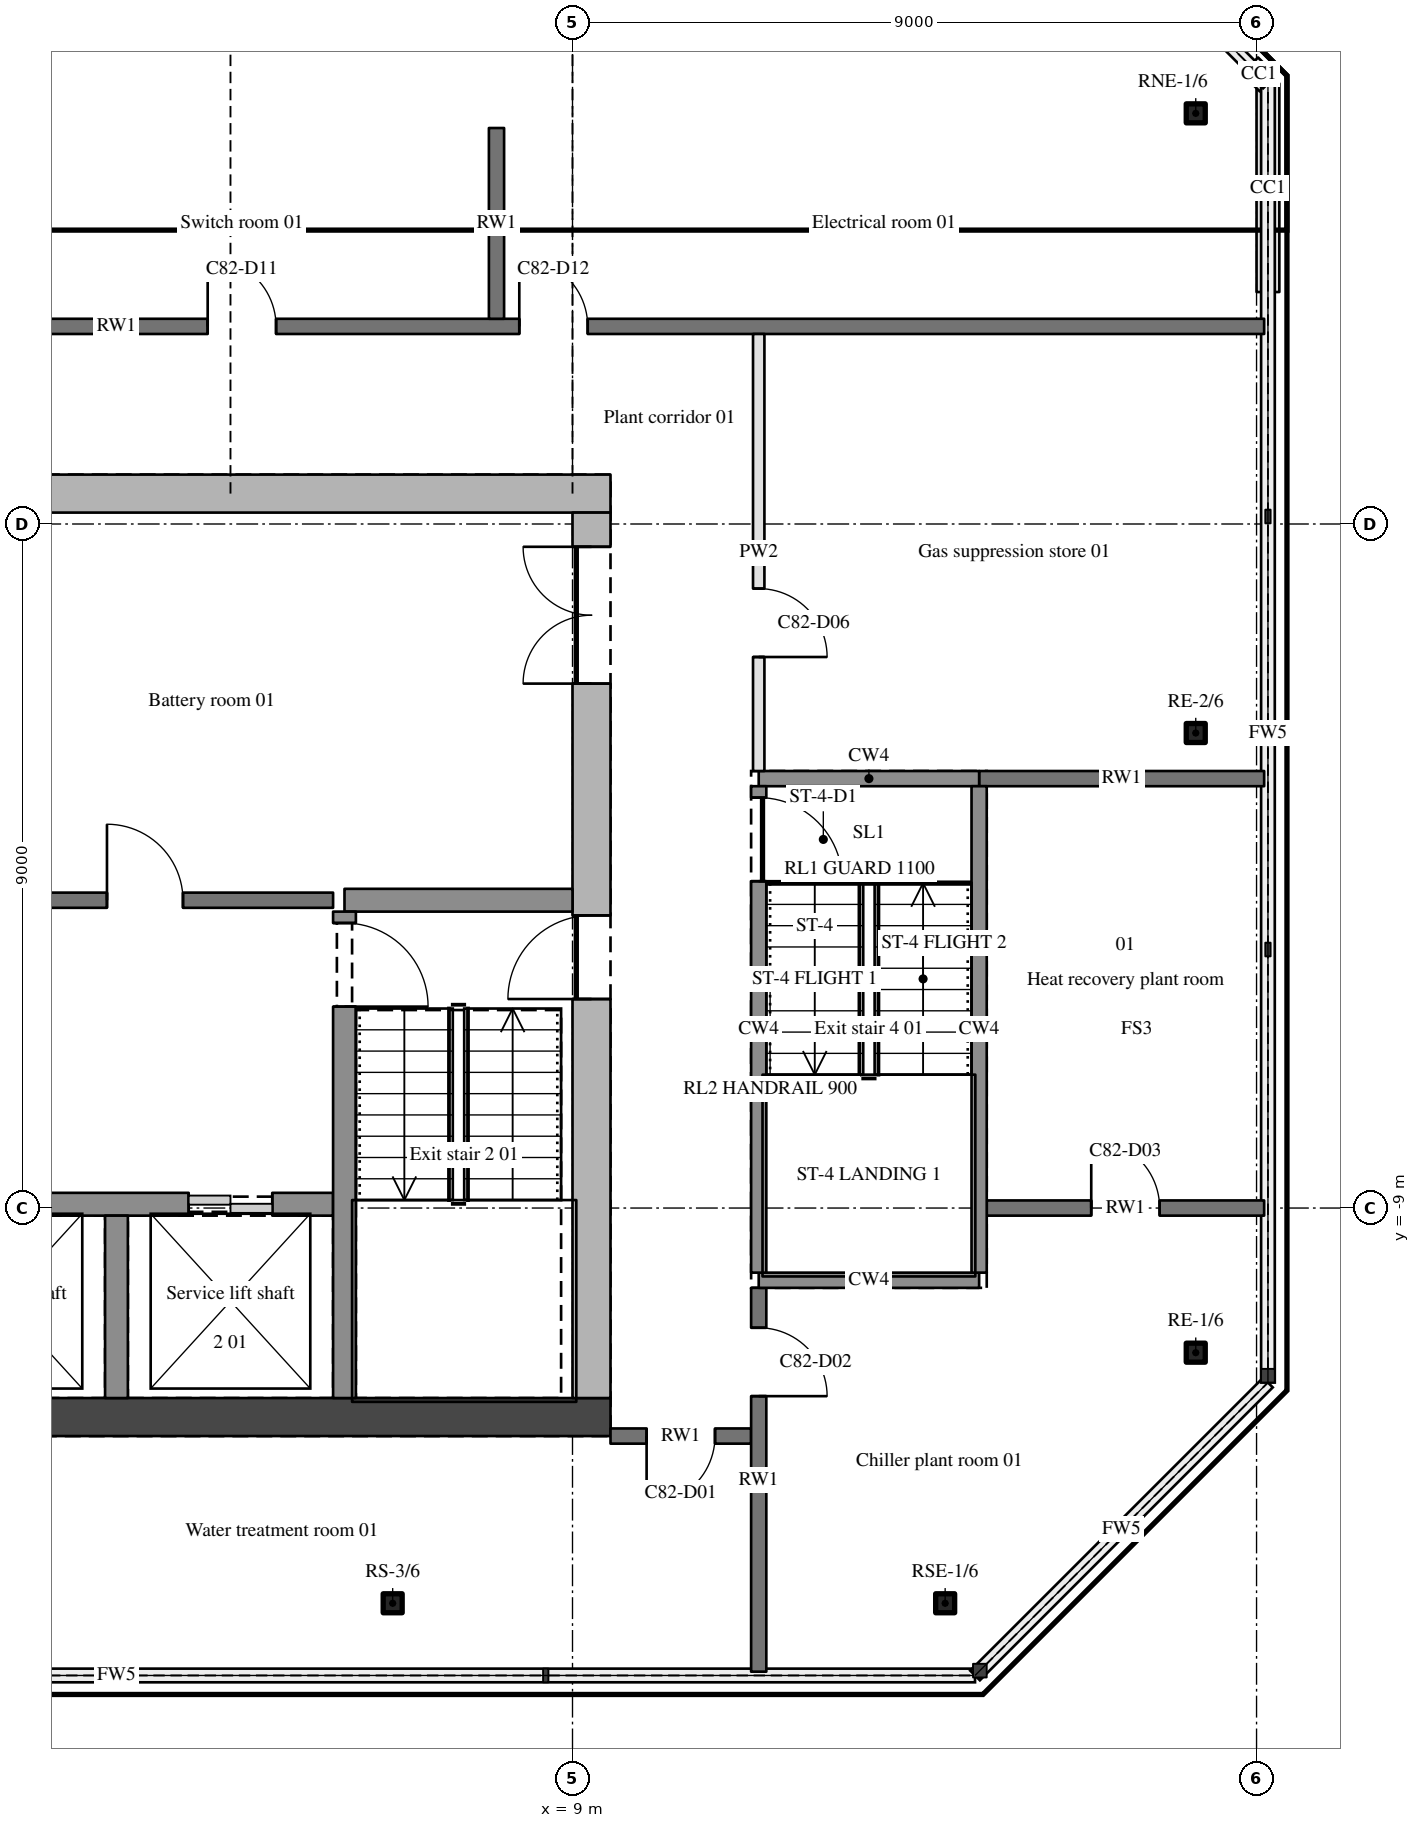
"""IFC4 building model, lengths in metres.
Left out: names, types, materials, properties, quantities, classifications, styles, units other than length and angle.
Written with IfcOpenShell. Run it as: python <this file> out.ifc"""

import sys

from ifc_helpers import new_model, si_unit, direction, frame, frame_2d, origin, origin_2d, place, context, subcontext, project, spatial, polyline, rectangle, hollow_rectangle, outline, extrude, element, fill, save


model = new_model("IFC4")
c1 = context("Model", 3, precision=1e-05, world=origin(), true_north=direction((0.0, 1.0)))
c2 = subcontext(c1, "Body", "Model", "MODEL_VIEW")
j1 = project(units=[si_unit("LENGTHUNIT", "METRE"), si_unit("PLANEANGLEUNIT", "RADIAN")], contexts=[c1])
p1 = place(None, origin())
s1 = spatial("IfcSite", under=j1, at=p1, CompositionType="ELEMENT")
p2 = place(p1, origin())
s2 = spatial("IfcBuilding", under=s1, at=p2, CompositionType="ELEMENT")
p3 = place(p2, frame((0.0, 0.0, 304.5)))
s3 = spatial("IfcBuildingStorey", under=s2, at=p3, CompositionType="ELEMENT", Elevation=304.5)
for number, where, z_axis, x_axis in (
    (1, (6.634, -14.2, 0.0), (0.0, 0.0, 1.0), (1.0, 0.0, 0.0)),
    (2, (13.903, -14.2, 0.0), (0.0, 0.0, 1.0), (1.0, 0.0, 0.0)),
    (3, (17.2, -10.903, 0.0), (0.0, 0.0, 1.0), (1.0, 0.0, 0.0)),
    (4, (17.2, -2.75, 0.0), (0.0, 0.0, 1.0), (1.0, 0.0, 0.0)),
):
    element("IfcColumn", number, at=place(p3, frame(where, z_axis=z_axis, x_axis=x_axis)), inside=s3, PredefinedType="COLUMN", context=c2, shape_type="SweptSolid", body=[
        extrude(hollow_rectangle(XDim=0.25, YDim=0.25, WallThickness=0.02, InnerFilletRadius=0.03, OuterFilletRadius=0.05, at=origin_2d()), origin(), (0.0, 0.0, 1.0), 3.6),
    ])
p4 = place(p3, frame((17.2, 5.403, 0.0), z_axis=(0.0, 0.0, 1.0), x_axis=(1.0, 0.0, 0.0)))
e5 = element("IfcColumn", 5, at=p4, inside=s3, PredefinedType="COLUMN", context=c2, shape_type="SweptSolid", body=[
    extrude(hollow_rectangle(XDim=0.25, YDim=0.25, WallThickness=0.02, InnerFilletRadius=0.03, OuterFilletRadius=0.05, at=origin_2d()), origin(), (0.0, 0.0, 1.0), 3.392),
])
for number, where, z_axis, x_axis in (
    (6, (-9.5, -11.75, 0.0), (0.0, 0.0, 1.0), (1.0, 0.0, 0.0)),
    (7, (-9.5, 0.4, 0.0), (0.0, 0.0, 1.0), (1.0, 0.0, 0.0)),
):
    element("IfcWall", number, at=place(p3, frame(where, z_axis=z_axis, x_axis=x_axis)), inside=s3, PredefinedType="SHEAR", context=c2, shape_type="SweptSolid", body=[
        extrude(outline(polyline([(0.0, 0.0), (19.0, 0.0), (19.0, 3.6), (0.0, 3.6), (0.0, 0.0)])), frame((0.0, 0.25, 0.0), z_axis=(0.0, -1.0, 0.0), x_axis=(1.0, 0.0, 0.0)), (0.0, 0.0, 1.0), 0.5),
    ])
p5 = place(p3, frame((9.25, -11.5, 0.0), z_axis=(0.0, 0.0, 1.0), x_axis=(0.0, 1.0, 0.0)))
e8 = element("IfcWall", 8, at=p5, inside=s3, PredefinedType="SHEAR", context=c2, shape_type="SweptSolid", body=[
    extrude(outline(polyline([(0.0, 0.0), (11.65, 0.0), (11.65, 3.6), (0.0, 3.6), (0.0, 0.0)])), frame((0.0, 0.25, 0.0), z_axis=(0.0, -1.0, 0.0), x_axis=(1.0, 0.0, 0.0)), (0.0, 0.0, 1.0), 0.5),
])
p6 = place(p5, frame((9.4, 0.0, 0.0)))
e9 = element("IfcOpeningElement", 9, at=p6, cuts=e8, PredefinedType="OPENING", context=c2, shape_type="SweptSolid", body=[
    extrude(rectangle(XDim=1.8, YDim=2.1, at=frame_2d((0.9, 1.05))), frame((0.0, 0.26, 0.0), z_axis=(0.0, -1.0, 0.0), x_axis=(1.0, 0.0, 0.0)), (0.0, 0.0, 1.0), 0.52),
])
p7 = place(p5, frame((5.25, 0.0, 0.0)))
e10 = element("IfcOpeningElement", 10, at=p7, cuts=e8, PredefinedType="OPENING", context=c2, shape_type="SweptSolid", body=[
    extrude(rectangle(XDim=1.1, YDim=2.1, at=frame_2d((0.55, 1.05))), frame((0.0, 0.26, 0.0), z_axis=(0.0, -1.0, 0.0), x_axis=(1.0, 0.0, 0.0)), (0.0, 0.0, 1.0), 0.52),
])
p8 = place(p3, frame((11.35, -12.0, 0.0), z_axis=(0.0, 0.0, 1.0), x_axis=(-1.0, 0.0, 0.0)))
e11 = element("IfcWall", 11, at=p8, inside=s3, PredefinedType="SOLIDWALL", context=c2, shape_type="SweptSolid", body=[
    extrude(rectangle(XDim=1.85, YDim=0.2, at=frame_2d((0.925, 0.0))), origin(), (0.0, 0.0, 1.0), 2.66),
])
p9 = place(p8, frame((0.475, 0.0, 0.0)))
e12 = element("IfcOpeningElement", 12, at=p9, cuts=e11, PredefinedType="OPENING", context=c2, shape_type="SweptSolid", body=[
    extrude(rectangle(XDim=0.9, YDim=2.1, at=frame_2d((0.45, 1.05))), frame((0.0, 0.11, 0.0), z_axis=(0.0, -1.0, 0.0), x_axis=(1.0, 0.0, 0.0)), (0.0, 0.0, 1.0), 0.22),
])
p10 = place(p3, frame((11.45, -9.95, 0.0), z_axis=(0.0, 0.0, 1.0), x_axis=(1.0, 0.0, 0.0)))
e13 = element("IfcWall", 13, at=p10, inside=s3, PredefinedType="SHEAR", context=c2, shape_type="SweptSolid", body=[
    extrude(rectangle(XDim=2.9, YDim=0.2, at=frame_2d((1.45, 0.0))), origin(), (0.0, 0.0, 1.0), 3.6),
])
p11 = place(p3, frame((14.45, -9.0, 0.0), z_axis=(0.0, 0.0, 1.0), x_axis=(1.0, 0.0, 0.0)))
e14 = element("IfcWall", 14, at=p11, inside=s3, PredefinedType="SOLIDWALL", context=c2, shape_type="SweptSolid", body=[
    extrude(rectangle(XDim=3.65, YDim=0.2, at=frame_2d((1.825, 0.0))), origin(), (0.0, 0.0, 1.0), 2.66),
])
p12 = place(p11, frame((1.375, 0.0, 0.0)))
e15 = element("IfcOpeningElement", 15, at=p12, cuts=e14, PredefinedType="OPENING", context=c2, shape_type="SweptSolid", body=[
    extrude(rectangle(XDim=0.9, YDim=2.1, at=frame_2d((0.45, 1.05))), frame((0.0, 0.11, 0.0), z_axis=(0.0, -1.0, 0.0), x_axis=(1.0, 0.0, 0.0)), (0.0, 0.0, 1.0), 0.22),
])
p13 = place(p3, frame((-5.85, -8.95, 0.0), z_axis=(0.0, 0.0, 1.0), x_axis=(1.0, 0.0, 0.0)))
e16 = element("IfcWall", 16, at=p13, inside=s3, PredefinedType="SHEAR", context=c2, shape_type="SweptSolid", body=[
    extrude(rectangle(XDim=11.7, YDim=0.3, at=frame_2d((5.85, 0.0))), origin(), (0.0, 0.0, 1.0), 3.6),
])
p14 = place(p13, frame((0.8, 0.0, 0.0)))
e17 = element("IfcOpeningElement", 17, at=p14, cuts=e16, PredefinedType="OPENING", context=c2, shape_type="SweptSolid", body=[
    extrude(rectangle(XDim=1.1, YDim=2.1, at=frame_2d((0.55, 1.05))), frame((0.0, 0.16, 0.0), z_axis=(0.0, -1.0, 0.0), x_axis=(1.0, 0.0, 0.0)), (0.0, 0.0, 1.0), 0.32),
])
p15 = place(p13, frame((3.8, 0.0, 0.0)))
e18 = element("IfcOpeningElement", 18, at=p15, cuts=e16, PredefinedType="OPENING", context=c2, shape_type="SweptSolid", body=[
    extrude(rectangle(XDim=1.1, YDim=2.1, at=frame_2d((0.55, 1.05))), frame((0.0, 0.16, 0.0), z_axis=(0.0, -1.0, 0.0), x_axis=(1.0, 0.0, 0.0)), (0.0, 0.0, 1.0), 0.32),
])
p16 = place(p13, frame((6.8, 0.0, 0.0)))
e19 = element("IfcOpeningElement", 19, at=p16, cuts=e16, PredefinedType="OPENING", context=c2, shape_type="SweptSolid", body=[
    extrude(rectangle(XDim=1.1, YDim=2.1, at=frame_2d((0.55, 1.05))), frame((0.0, 0.16, 0.0), z_axis=(0.0, -1.0, 0.0), x_axis=(1.0, 0.0, 0.0)), (0.0, 0.0, 1.0), 0.32),
])
p17 = place(p13, frame((9.8, 0.0, 0.0)))
e20 = element("IfcOpeningElement", 20, at=p17, cuts=e16, PredefinedType="OPENING", context=c2, shape_type="SweptSolid", body=[
    extrude(rectangle(XDim=1.1, YDim=2.1, at=frame_2d((0.55, 1.05))), frame((0.0, 0.16, 0.0), z_axis=(0.0, -1.0, 0.0), x_axis=(1.0, 0.0, 0.0)), (0.0, 0.0, 1.0), 0.32),
])
p18 = place(p3, frame((0.9, -4.95, 0.0), z_axis=(0.0, 0.0, 1.0), x_axis=(1.0, 0.0, 0.0)))
e21 = element("IfcWall", 21, at=p18, inside=s3, PredefinedType="SOLIDWALL", context=c2, shape_type="SweptSolid", body=[
    extrude(rectangle(XDim=4.95, YDim=0.2, at=frame_2d((2.475, 0.0))), origin(), (0.0, 0.0, 1.0), 3.3),
])
p19 = place(p18, frame((1.975, 0.0, 0.0)))
e22 = element("IfcOpeningElement", 22, at=p19, cuts=e21, PredefinedType="OPENING", context=c2, shape_type="SweptSolid", body=[
    extrude(rectangle(XDim=1.0, YDim=2.1, at=frame_2d((0.5, 1.05))), frame((0.0, 0.11, 0.0), z_axis=(0.0, -1.0, 0.0), x_axis=(1.0, 0.0, 0.0)), (0.0, 0.0, 1.0), 0.22),
])
p20 = place(p3, frame((6.0, -4.95, 0.0), z_axis=(0.0, 0.0, 1.0), x_axis=(1.0, 0.0, 0.0)))
e23 = element("IfcWall", 23, at=p20, inside=s3, PredefinedType="SHEAR", context=c2, shape_type="SweptSolid", body=[
    extrude(rectangle(XDim=3.0, YDim=0.3, at=frame_2d((1.5, 0.0))), origin(), (0.0, 0.0, 1.0), 3.6),
])
p21 = place(p3, frame((11.45, -3.35, 0.0), z_axis=(0.0, 0.0, 1.0), x_axis=(1.0, 0.0, 0.0)))
e24 = element("IfcWall", 24, at=p21, inside=s3, PredefinedType="SHEAR", context=c2, shape_type="SweptSolid", body=[
    extrude(rectangle(XDim=2.9, YDim=0.2, at=frame_2d((1.45, 0.0))), origin(), (0.0, 0.0, 1.0), 3.6),
])
p22 = place(p3, frame((14.35, -3.35, 0.0), z_axis=(0.0, 0.0, 1.0), x_axis=(1.0, 0.0, 0.0)))
e25 = element("IfcWall", 25, at=p22, inside=s3, PredefinedType="SOLIDWALL", context=c2, shape_type="SweptSolid", body=[
    extrude(rectangle(XDim=3.75, YDim=0.2, at=frame_2d((1.875, 0.0))), origin(), (0.0, 0.0, 1.0), 2.66),
])
p23 = place(p3, frame((-12.1, 2.6, 0.0), z_axis=(0.0, 0.0, 1.0), x_axis=(1.0, 0.0, 0.0)))
e26 = element("IfcWall", 26, at=p23, inside=s3, PredefinedType="SOLIDWALL", context=c2, shape_type="SweptSolid", body=[
    extrude(rectangle(XDim=30.2, YDim=0.2, at=frame_2d((15.1, 0.0))), origin(), (0.0, 0.0, 1.0), 2.66),
])
p24 = place(p23, frame((6.25, 0.0, 0.0)))
e27 = element("IfcOpeningElement", 27, at=p24, cuts=e26, PredefinedType="OPENING", context=c2, shape_type="SweptSolid", body=[
    extrude(rectangle(XDim=0.9, YDim=2.1, at=frame_2d((0.45, 1.05))), frame((0.0, 0.11, 0.0), z_axis=(0.0, -1.0, 0.0), x_axis=(1.0, 0.0, 0.0)), (0.0, 0.0, 1.0), 0.22),
])
p25 = place(p23, frame((16.3, 0.0, 0.0)))
e28 = element("IfcOpeningElement", 28, at=p25, cuts=e26, PredefinedType="OPENING", context=c2, shape_type="SweptSolid", body=[
    extrude(rectangle(XDim=0.9, YDim=2.1, at=frame_2d((0.45, 1.05))), frame((0.0, 0.11, 0.0), z_axis=(0.0, -1.0, 0.0), x_axis=(1.0, 0.0, 0.0)), (0.0, 0.0, 1.0), 0.22),
])
p26 = place(p23, frame((20.4, 0.0, 0.0)))
e29 = element("IfcOpeningElement", 29, at=p26, cuts=e26, PredefinedType="OPENING", context=c2, shape_type="SweptSolid", body=[
    extrude(rectangle(XDim=0.9, YDim=2.1, at=frame_2d((0.45, 1.05))), frame((0.0, 0.11, 0.0), z_axis=(0.0, -1.0, 0.0), x_axis=(1.0, 0.0, 0.0)), (0.0, 0.0, 1.0), 0.22),
])
p27 = place(p3, frame((3.0, -11.5, 0.0), z_axis=(0.0, 0.0, 1.0), x_axis=(0.0, 1.0, 0.0)))
e30 = element("IfcWall", 30, at=p27, inside=s3, PredefinedType="SHEAR", context=c2, shape_type="SweptSolid", body=[
    extrude(rectangle(XDim=2.4, YDim=0.3, at=frame_2d((1.2, 0.0))), origin(), (0.0, 0.0, 1.0), 3.6),
])
p28 = place(p3, frame((6.0, -5.1, 0.0), z_axis=(0.0, 0.0, 1.0), x_axis=(0.0, -1.0, 0.0)))
e31 = element("IfcWall", 31, at=p28, inside=s3, PredefinedType="SHEAR", context=c2, shape_type="SweptSolid", body=[
    extrude(rectangle(XDim=6.4, YDim=0.3, at=frame_2d((3.2, 0.0))), origin(), (0.0, 0.0, 1.0), 3.6),
])
p29 = place(p28, frame((0.15, 0.0, 0.0)))
e32 = element("IfcOpeningElement", 32, at=p29, cuts=e31, PredefinedType="OPENING", context=c2, shape_type="SweptSolid", body=[
    extrude(rectangle(XDim=1.1, YDim=2.1, at=frame_2d((0.55, 1.05))), frame((0.0, 0.16, 0.0), z_axis=(0.0, -1.0, 0.0), x_axis=(1.0, 0.0, 0.0)), (0.0, 0.0, 1.0), 0.32),
])
p30 = place(p3, frame((8.0, 2.7, 0.0), z_axis=(0.0, 0.0, 1.0), x_axis=(0.0, 1.0, 0.0)))
e33 = element("IfcWall", 33, at=p30, inside=s3, PredefinedType="SOLIDWALL", context=c2, shape_type="SweptSolid", body=[
    extrude(rectangle(XDim=2.51, YDim=0.2, at=frame_2d((1.255, 0.0))), origin(), (0.0, 0.0, 1.0), 2.66),
])
p31 = place(p3, frame((11.45, -10.05, 0.0), z_axis=(0.0, 0.0, 1.0), x_axis=(0.0, -1.0, 0.0)))
e34 = element("IfcWall", 34, at=p31, inside=s3, PredefinedType="SOLIDWALL", context=c2, shape_type="SweptSolid", body=[
    extrude(rectangle(XDim=5.05, YDim=0.2, at=frame_2d((2.525, 0.0))), origin(), (0.0, 0.0, 1.0), 2.66),
])
p32 = place(p31, frame((0.525, 0.0, 0.0)))
e35 = element("IfcOpeningElement", 35, at=p32, cuts=e34, PredefinedType="OPENING", context=c2, shape_type="SweptSolid", body=[
    extrude(rectangle(XDim=0.9, YDim=2.1, at=frame_2d((0.45, 1.05))), frame((0.0, 0.11, 0.0), z_axis=(0.0, -1.0, 0.0), x_axis=(1.0, 0.0, 0.0)), (0.0, 0.0, 1.0), 0.22),
])
p33 = place(p3, frame((11.45, -3.45, 0.0), z_axis=(0.0, 0.0, 1.0), x_axis=(0.0, -1.0, 0.0)))
e36 = element("IfcWall", 36, at=p33, inside=s3, PredefinedType="SHEAR", context=c2, shape_type="SweptSolid", body=[
    extrude(rectangle(XDim=6.4, YDim=0.2, at=frame_2d((3.2, 0.0))), origin(), (0.0, 0.0, 1.0), 3.6),
])
p34 = place(p33, frame((0.15, 0.0, 0.0)))
e37 = element("IfcOpeningElement", 37, at=p34, cuts=e36, PredefinedType="OPENING", context=c2, shape_type="SweptSolid", body=[
    extrude(rectangle(XDim=1.1, YDim=2.1, at=frame_2d((0.55, 1.05))), frame((0.0, 0.11, 0.0), z_axis=(0.0, -1.0, 0.0), x_axis=(1.0, 0.0, 0.0)), (0.0, 0.0, 1.0), 0.22),
])
p35 = place(p3, frame((11.45, 2.5, 0.0), z_axis=(0.0, 0.0, 1.0), x_axis=(0.0, -1.0, 0.0)))
e38 = element("IfcWall", 38, at=p35, inside=s3, PredefinedType="PARTITIONING", context=c2, shape_type="SweptSolid", body=[
    extrude(rectangle(XDim=5.75, YDim=0.15, at=frame_2d((2.875, 0.0))), origin(), (0.0, 0.0, 1.0), 2.66),
])
p36 = place(p35, frame((3.35, 0.0, 0.0)))
e39 = element("IfcOpeningElement", 39, at=p36, cuts=e38, PredefinedType="OPENING", context=c2, shape_type="SweptSolid", body=[
    extrude(rectangle(XDim=0.9, YDim=2.1, at=frame_2d((0.45, 1.05))), frame((0.0, 0.085, 0.0), z_axis=(0.0, -1.0, 0.0), x_axis=(1.0, 0.0, 0.0)), (0.0, 0.0, 1.0), 0.17),
])
p37 = place(p3, frame((14.35, -9.85, 0.0), z_axis=(0.0, 0.0, 1.0), x_axis=(0.0, 1.0, 0.0)))
e40 = element("IfcWall", 40, at=p37, inside=s3, PredefinedType="SHEAR", context=c2, shape_type="SweptSolid", body=[
    extrude(rectangle(XDim=6.4, YDim=0.2, at=frame_2d((3.2, 0.0))), origin(), (0.0, 0.0, 1.0), 3.6),
])
p38 = place(p6, origin())
e41 = element("IfcDoor", 41, at=p38, inside=s3, OperationType="DOUBLE_DOOR_SINGLE_SWING", PredefinedType="DOOR", context=c2, shape_type="SweptSolid", body=[
    extrude(rectangle(XDim=1.8, YDim=2.1, at=frame_2d((0.9, 1.05))), frame((0.0, 0.025, 0.0), z_axis=(0.0, -1.0, 0.0), x_axis=(1.0, 0.0, 0.0)), (0.0, 0.0, 1.0), 0.05),
])
fill(e9, e41)
p39 = place(p19, origin())
e42 = element("IfcDoor", 42, at=p39, inside=s3, OperationType="SINGLE_SWING_LEFT", PredefinedType="DOOR", context=c2, shape_type="SweptSolid", body=[
    extrude(rectangle(XDim=1.0, YDim=2.1, at=frame_2d((0.5, 1.05))), frame((0.0, 0.025, 0.0), z_axis=(0.0, -1.0, 0.0), x_axis=(1.0, 0.0, 0.0)), (0.0, 0.0, 1.0), 0.05),
])
fill(e22, e42)
p40 = place(p29, origin())
e43 = element("IfcDoor", 43, at=p40, inside=s3, OperationType="SINGLE_SWING_RIGHT", PredefinedType="DOOR", context=c2, shape_type="SweptSolid", body=[
    extrude(rectangle(XDim=1.1, YDim=2.1, at=frame_2d((0.55, 1.05))), frame((0.0, 0.025, 0.0), z_axis=(0.0, -1.0, 0.0), x_axis=(1.0, 0.0, 0.0)), (0.0, 0.0, 1.0), 0.05),
])
fill(e32, e43)
p41 = place(p7, origin())
e44 = element("IfcDoor", 44, at=p41, inside=s3, OperationType="SINGLE_SWING_LEFT", PredefinedType="DOOR", context=c2, shape_type="SweptSolid", body=[
    extrude(rectangle(XDim=1.1, YDim=2.1, at=frame_2d((0.55, 1.05))), frame((0.0, 0.025, 0.0), z_axis=(0.0, -1.0, 0.0), x_axis=(1.0, 0.0, 0.0)), (0.0, 0.0, 1.0), 0.05),
])
fill(e10, e44)
p42 = place(p34, origin())
e45 = element("IfcDoor", 45, at=p42, inside=s3, OperationType="SINGLE_SWING_RIGHT", PredefinedType="DOOR", context=c2, shape_type="SweptSolid", body=[
    extrude(rectangle(XDim=1.1, YDim=2.1, at=frame_2d((0.55, 1.05))), frame((0.0, 0.025, 0.0), z_axis=(0.0, -1.0, 0.0), x_axis=(1.0, 0.0, 0.0)), (0.0, 0.0, 1.0), 0.05),
])
fill(e37, e45)
p43 = place(p32, origin())
e46 = element("IfcDoor", 46, at=p43, inside=s3, OperationType="SINGLE_SWING_RIGHT", PredefinedType="DOOR", context=c2, shape_type="SweptSolid", body=[
    extrude(rectangle(XDim=0.9, YDim=2.1, at=frame_2d((0.45, 1.05))), frame((0.0, 0.025, 0.0), z_axis=(0.0, -1.0, 0.0), x_axis=(1.0, 0.0, 0.0)), (0.0, 0.0, 1.0), 0.05),
])
fill(e35, e46)
p44 = place(p36, origin())
e47 = element("IfcDoor", 47, at=p44, inside=s3, OperationType="SINGLE_SWING_RIGHT", PredefinedType="DOOR", context=c2, shape_type="SweptSolid", body=[
    extrude(rectangle(XDim=0.9, YDim=2.1, at=frame_2d((0.45, 1.05))), frame((0.0, 0.025, 0.0), z_axis=(0.0, -1.0, 0.0), x_axis=(1.0, 0.0, 0.0)), (0.0, 0.0, 1.0), 0.05),
])
fill(e39, e47)
p45 = place(p25, origin())
e48 = element("IfcDoor", 48, at=p45, inside=s3, OperationType="SINGLE_SWING_LEFT", PredefinedType="DOOR", context=c2, shape_type="SweptSolid", body=[
    extrude(rectangle(XDim=0.9, YDim=2.1, at=frame_2d((0.45, 1.05))), frame((0.0, 0.025, 0.0), z_axis=(0.0, -1.0, 0.0), x_axis=(1.0, 0.0, 0.0)), (0.0, 0.0, 1.0), 0.05),
])
fill(e28, e48)
p46 = place(p26, origin())
e49 = element("IfcDoor", 49, at=p46, inside=s3, OperationType="SINGLE_SWING_LEFT", PredefinedType="DOOR", context=c2, shape_type="SweptSolid", body=[
    extrude(rectangle(XDim=0.9, YDim=2.1, at=frame_2d((0.45, 1.05))), frame((0.0, 0.025, 0.0), z_axis=(0.0, -1.0, 0.0), x_axis=(1.0, 0.0, 0.0)), (0.0, 0.0, 1.0), 0.05),
])
fill(e29, e49)
p47 = place(p9, origin())
e50 = element("IfcDoor", 50, at=p47, inside=s3, OperationType="SINGLE_SWING_RIGHT", PredefinedType="DOOR", context=c2, shape_type="SweptSolid", body=[
    extrude(rectangle(XDim=0.9, YDim=2.1, at=frame_2d((0.45, 1.05))), frame((0.0, 0.025, 0.0), z_axis=(0.0, -1.0, 0.0), x_axis=(1.0, 0.0, 0.0)), (0.0, 0.0, 1.0), 0.05),
])
fill(e12, e50)
p48 = place(p12, origin())
e51 = element("IfcDoor", 51, at=p48, inside=s3, OperationType="SINGLE_SWING_LEFT", PredefinedType="DOOR", context=c2, shape_type="SweptSolid", body=[
    extrude(rectangle(XDim=0.9, YDim=2.1, at=frame_2d((0.45, 1.05))), frame((0.0, 0.025, 0.0), z_axis=(0.0, -1.0, 0.0), x_axis=(1.0, 0.0, 0.0)), (0.0, 0.0, 1.0), 0.05),
])
fill(e15, e51)
p49 = place(p17, origin())
e52 = element("IfcDoor", 52, at=p49, inside=s3, OperationType="DOUBLE_DOOR_SLIDING", PredefinedType="DOOR", context=c2, shape_type="SweptSolid", body=[
    extrude(rectangle(XDim=1.1, YDim=2.1, at=frame_2d((0.55, 1.05))), frame((0.0, 0.025, 0.0), z_axis=(0.0, -1.0, 0.0), x_axis=(1.0, 0.0, 0.0)), (0.0, 0.0, 1.0), 0.05),
])
fill(e20, e52)
save(model, sys.argv[1])
